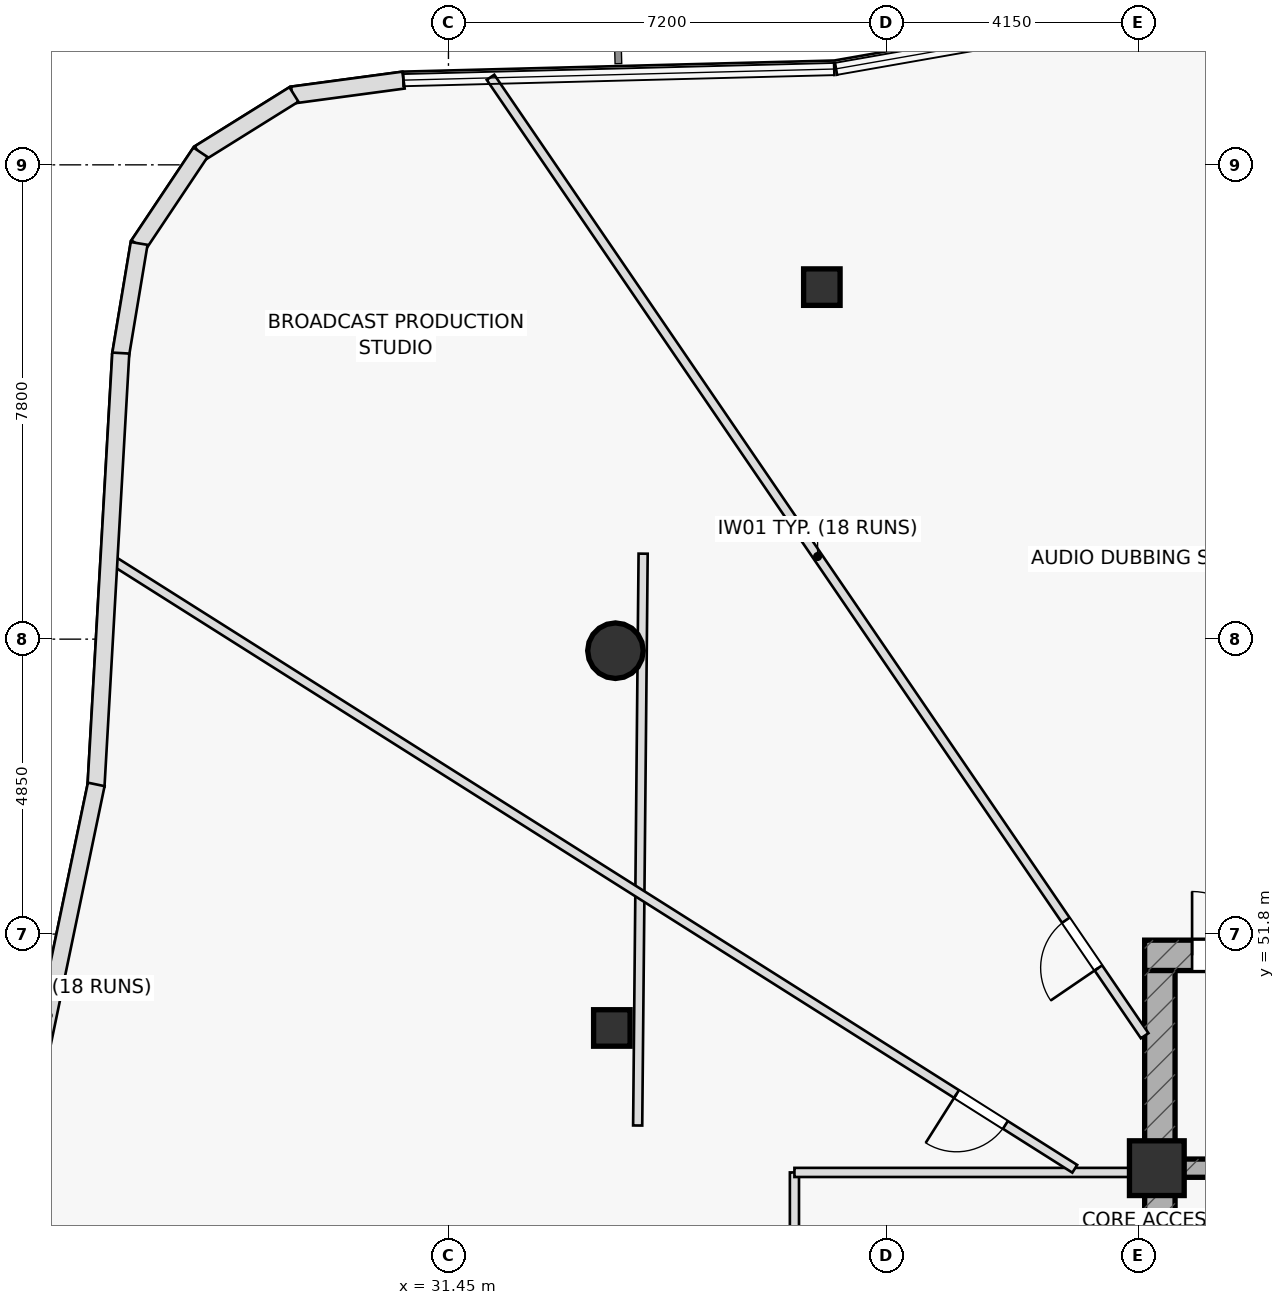
"""IFC4 building model, lengths in metres.
Left out: names, types, materials, properties, quantities, classifications, styles, units other than length and angle.
Written with IfcOpenShell. Run it as: python <this file> out.ifc"""

import sys

from ifc_helpers import new_model, si_unit, direction, frame, frame_2d, origin, origin_2d, place, context, subcontext, project, spatial, rectangle, hollow_rectangle, hollow_circle, extrude, element, fill, save


model = new_model("IFC4")
c1 = context("Model", 3, precision=1e-05, world=origin(), true_north=direction((0.0, 1.0)))
c2 = subcontext(c1, "Body", "Model", "MODEL_VIEW")
j1 = project(units=[si_unit("LENGTHUNIT", "METRE"), si_unit("PLANEANGLEUNIT", "RADIAN")], contexts=[c1])
p1 = place(None, origin())
s1 = spatial("IfcSite", under=j1, at=p1, CompositionType="ELEMENT")
p2 = place(p1, origin())
s2 = spatial("IfcBuilding", under=s1, at=p2, CompositionType="ELEMENT")
p3 = place(p2, frame((0.0, 0.0, 226.1)))
s3 = spatial("IfcBuildingStorey", under=s2, at=p3, CompositionType="ELEMENT", Elevation=226.1)
p4 = place(p3, frame((42.9, 51.45, 0.0), z_axis=(0.0, 0.0, 1.0), x_axis=(1.0, 0.0, 0.0)))
e1 = element("IfcWall", 1, at=p4, inside=s3, PredefinedType="SHEAR", context=c2, shape_type="SweptSolid", body=[
    extrude(rectangle(XDim=14.2, YDim=0.5, at=frame_2d((7.1, 0.0))), origin(), (0.0, 0.0, 1.0), 3.65),
])
p5 = place(p4, frame((0.78, 0.0, 0.0)))
e2 = element("IfcOpeningElement", 2, at=p5, cuts=e1, PredefinedType="OPENING", context=c2, shape_type="SweptSolid", body=[
    extrude(rectangle(XDim=1.05, YDim=2.2, at=frame_2d((0.525, 1.1))), frame((0.0, 0.26, 0.0), z_axis=(0.0, -1.0, 0.0), x_axis=(1.0, 0.0, 0.0)), (0.0, 0.0, 1.0), 0.52),
])
p6 = place(p3, frame((43.15, 38.8, 0.0), z_axis=(0.0, 0.0, 1.0), x_axis=(0.0, 1.0, 0.0)))
e3 = element("IfcWall", 3, at=p6, inside=s3, PredefinedType="SHEAR", context=c2, shape_type="SweptSolid", body=[
    extrude(rectangle(XDim=12.4, YDim=0.5, at=frame_2d((6.2, 0.0))), origin(), (0.0, 0.0, 1.0), 3.65),
])
p7 = place(p3, frame((43.4, 47.95, 0.0), z_axis=(0.0, 0.0, 1.0), x_axis=(1.0, 0.0, 0.0)))
e4 = element("IfcWall", 4, at=p7, inside=s3, PredefinedType="SHEAR", context=c2, shape_type="SweptSolid", body=[
    extrude(rectangle(XDim=13.2, YDim=0.3, at=frame_2d((6.6, 0.0))), origin(), (0.0, 0.0, 1.0), 3.65),
])
p8 = place(p7, frame((8.345, 0.0, 0.0)))
e5 = element("IfcOpeningElement", 5, at=p8, cuts=e4, PredefinedType="OPENING", context=c2, shape_type="SweptSolid", body=[
    extrude(rectangle(XDim=1.15, YDim=2.2, at=frame_2d((0.575, 1.1))), frame((0.0, 0.16, 0.0), z_axis=(0.0, -1.0, 0.0), x_axis=(1.0, 0.0, 0.0)), (0.0, 0.0, 1.0), 0.32),
])
p9 = place(p7, frame((10.065, 0.0, 0.0)))
e6 = element("IfcOpeningElement", 6, at=p9, cuts=e4, PredefinedType="OPENING", context=c2, shape_type="SweptSolid", body=[
    extrude(rectangle(XDim=1.15, YDim=2.2, at=frame_2d((0.575, 1.1))), frame((0.0, 0.16, 0.0), z_axis=(0.0, -1.0, 0.0), x_axis=(1.0, 0.0, 0.0)), (0.0, 0.0, 1.0), 0.32),
])
p10 = place(p7, frame((11.645, 0.0, 0.0)))
e7 = element("IfcOpeningElement", 7, at=p10, cuts=e4, PredefinedType="OPENING", context=c2, shape_type="SweptSolid", body=[
    extrude(rectangle(XDim=1.15, YDim=2.2, at=frame_2d((0.575, 1.1))), frame((0.0, 0.16, 0.0), z_axis=(0.0, -1.0, 0.0), x_axis=(1.0, 0.0, 0.0)), (0.0, 0.0, 1.0), 0.32),
])
p11 = place(p3, frame((43.1, 47.95, 0.0), z_axis=(0.0, 0.0, 1.0), x_axis=(1.0, 0.0, 0.0)))
e8 = element("IfcColumn", 8, at=p11, inside=s3, PredefinedType="COLUMN", context=c2, shape_type="SweptSolid", body=[
    extrude(rectangle(XDim=0.9, YDim=0.9, at=origin_2d()), origin(), (0.0, 0.0, 1.0), 3.65),
])
p12 = place(p3, frame((34.196, 56.46, 0.0), z_axis=(0.0, 0.0, 1.0), x_axis=(1.0, 0.0, 0.0)))
e9 = element("IfcColumn", 9, at=p12, inside=s3, PredefinedType="COLUMN", context=c2, shape_type="SweptSolid", body=[
    extrude(hollow_circle(Radius=0.457, WallThickness=0.04, at=origin_2d()), origin(), (0.0, 0.0, 1.0), 3.65),
])
for number, where, z_axis, x_axis in (
    (10, (34.137, 50.256, 0.0), (0.0, 0.0, 1.0), (1.0, 0.0, 0.0)),
    (11, (37.591, 62.439, 0.0), (0.0, 0.0, 1.0), (1.0, 0.0, 0.0)),
):
    element("IfcColumn", number, at=place(p3, frame(where, z_axis=z_axis, x_axis=x_axis)), inside=s3, PredefinedType="COLUMN", context=c2, shape_type="SweptSolid", body=[
        extrude(hollow_rectangle(XDim=0.6, YDim=0.6, WallThickness=0.036, at=origin_2d()), origin(), (0.0, 0.0, 1.0), 3.65),
    ])
p13 = place(p3, frame((34.652, 58.056, 0.0), z_axis=(0.0, 0.0, 1.0), x_axis=(-0.009553538759, -0.999954363907, 0.0)))
e12 = element("IfcWall", 12, at=p13, inside=s3, PredefinedType="PARTITIONING", context=c2, shape_type="SweptSolid", body=[
    extrude(rectangle(XDim=9.404, YDim=0.15, at=frame_2d((4.702, 0.0))), origin(), (0.0, 0.0, 1.0), 3.135),
])
p14 = place(p3, frame((37.14, 40.3, 0.0), z_axis=(0.0, 0.0, 1.0), x_axis=(0.0, 1.0, 0.0)))
e13 = element("IfcWall", 13, at=p14, inside=s3, PredefinedType="PARTITIONING", context=c2, shape_type="SweptSolid", body=[
    extrude(rectangle(XDim=7.58, YDim=0.15, at=frame_2d((3.79, 0.0))), origin(), (0.0, 0.0, 1.0), 3.65),
])
p15 = place(p3, frame((37.14, 47.88, 0.0), z_axis=(0.0, 0.0, 1.0), x_axis=(1.0, 0.0, 0.0)))
e14 = element("IfcWall", 14, at=p15, inside=s3, PredefinedType="PARTITIONING", context=c2, shape_type="SweptSolid", body=[
    extrude(rectangle(XDim=5.76, YDim=0.15, at=frame_2d((2.88, 0.0))), origin(), (0.0, 0.0, 1.0), 3.025),
])
p16 = place(p3, frame((42.9, 50.128, 0.0), z_axis=(0.0, 0.0, 1.0), x_axis=(-0.563748413046, 0.825946564124, 0.0)))
e15 = element("IfcWall", 15, at=p16, inside=s3, PredefinedType="PARTITIONING", context=c2, shape_type="SweptSolid", body=[
    extrude(rectangle(XDim=19.083, YDim=0.15, at=frame_2d((9.542, 0.0))), origin(), (0.0, 0.0, 1.0), 3.025),
])
p17 = place(p16, frame((1.35, 0.0, 0.0)))
e16 = element("IfcOpeningElement", 16, at=p17, cuts=e15, PredefinedType="OPENING", context=c2, shape_type="SweptSolid", body=[
    extrude(rectangle(XDim=0.95, YDim=2.05, at=frame_2d((0.475, 1.025))), frame((0.0, 0.085, 0.0), z_axis=(0.0, -1.0, 0.0), x_axis=(1.0, 0.0, 0.0)), (0.0, 0.0, 1.0), 0.17),
])
p18 = place(p3, frame((41.75, 47.94, 0.0), z_axis=(0.0, 0.0, 1.0), x_axis=(-0.845215418547, 0.534425763086, 0.0)))
e17 = element("IfcWall", 17, at=p18, inside=s3, PredefinedType="PARTITIONING", context=c2, shape_type="SweptSolid", body=[
    extrude(rectangle(XDim=18.802, YDim=0.15, at=frame_2d((9.401, 0.0))), origin(), (0.0, 0.0, 1.0), 3.025),
])
p19 = place(p18, frame((1.35, 0.0, 0.0)))
e18 = element("IfcOpeningElement", 18, at=p19, cuts=e17, PredefinedType="OPENING", context=c2, shape_type="SweptSolid", body=[
    extrude(rectangle(XDim=0.95, YDim=2.05, at=frame_2d((0.475, 1.025))), frame((0.0, 0.085, 0.0), z_axis=(0.0, -1.0, 0.0), x_axis=(1.0, 0.0, 0.0)), (0.0, 0.0, 1.0), 0.17),
])
p20 = place(p3, frame((30.711, 65.844, 0.0), z_axis=(0.0, 0.0, 1.0), x_axis=(-0.99110396013, -0.133089970376, 0.0)))
e19 = element("IfcWall", 19, at=p20, inside=s3, PredefinedType="STANDARD", context=c2, shape_type="SweptSolid", body=[
    extrude(rectangle(XDim=1.847, YDim=0.28, at=frame_2d((0.924, 0.0))), origin(), (0.0, 0.0, 1.0), 3.65),
])
for number, where, z_axis, x_axis in (
    (20, (28.908, 65.607, 0.0), (0.0, 0.0, 1.0), (-0.849, -0.529, 0.0)),
    (21, (27.372, 64.656, 0.0), (0.0, 0.0, 1.0), (-0.556, -0.831, 0.0)),
):
    element("IfcWall", number, at=place(p3, frame(where, z_axis=z_axis, x_axis=x_axis)), inside=s3, PredefinedType="STANDARD", context=c2, shape_type="SweptSolid", body=[
        extrude(rectangle(XDim=1.835, YDim=0.28, at=frame_2d((0.918, 0.0))), origin(), (0.0, 0.0, 1.0), 3.65),
    ])
p21 = place(p3, frame((26.363, 63.158, 0.0), z_axis=(0.0, 0.0, 1.0), x_axis=(-0.164100698814, -0.986443592229, 0.0)))
e22 = element("IfcWall", 22, at=p21, inside=s3, PredefinedType="STANDARD", context=c2, shape_type="SweptSolid", body=[
    extrude(rectangle(XDim=1.858, YDim=0.28, at=frame_2d((0.929, 0.0))), origin(), (0.0, 0.0, 1.0), 3.65),
])
p22 = place(p3, frame((26.061, 61.354, 0.0), z_axis=(0.0, 0.0, 1.0), x_axis=(-0.057145290903, -0.998365872678, 0.0)))
e23 = element("IfcWall", 23, at=p22, inside=s3, PredefinedType="STANDARD", context=c2, shape_type="SweptSolid", body=[
    extrude(rectangle(XDim=7.135, YDim=0.28, at=frame_2d((3.567, 0.0))), origin(), (0.0, 0.0, 1.0), 3.65),
])
p23 = place(p3, frame((25.657, 54.261, 0.0), z_axis=(0.0, 0.0, 1.0), x_axis=(-0.203778439019, -0.97901703141, 0.0)))
e24 = element("IfcWall", 24, at=p23, inside=s3, PredefinedType="STANDARD", context=c2, shape_type="SweptSolid", body=[
    extrude(rectangle(XDim=7.763, YDim=0.28, at=frame_2d((3.882, 0.0))), origin(), (0.0, 0.0, 1.0), 3.65),
])
p24 = place(p5, origin())
e25 = element("IfcDoor", 25, at=p24, inside=s3, OperationType="SINGLE_SWING_LEFT", PredefinedType="DOOR", context=c2, shape_type="SweptSolid", body=[
    extrude(rectangle(XDim=1.05, YDim=2.2, at=frame_2d((0.525, 1.1))), frame((0.0, 0.025, 0.0), z_axis=(0.0, -1.0, 0.0), x_axis=(1.0, 0.0, 0.0)), (0.0, 0.0, 1.0), 0.05),
])
fill(e2, e25)
p25 = place(p17, origin())
e26 = element("IfcDoor", 26, at=p25, inside=s3, OperationType="SINGLE_SWING_LEFT", PredefinedType="DOOR", context=c2, shape_type="SweptSolid", body=[
    extrude(rectangle(XDim=0.95, YDim=2.05, at=frame_2d((0.475, 1.025))), frame((0.0, 0.025, 0.0), z_axis=(0.0, -1.0, 0.0), x_axis=(1.0, 0.0, 0.0)), (0.0, 0.0, 1.0), 0.05),
])
fill(e16, e26)
p26 = place(p19, origin())
e27 = element("IfcDoor", 27, at=p26, inside=s3, OperationType="SINGLE_SWING_RIGHT", PredefinedType="DOOR", context=c2, shape_type="SweptSolid", body=[
    extrude(rectangle(XDim=0.95, YDim=2.05, at=frame_2d((0.475, 1.025))), frame((0.0, 0.025, 0.0), z_axis=(0.0, -1.0, 0.0), x_axis=(1.0, 0.0, 0.0)), (0.0, 0.0, 1.0), 0.05),
])
fill(e18, e27)
save(model, sys.argv[1])
